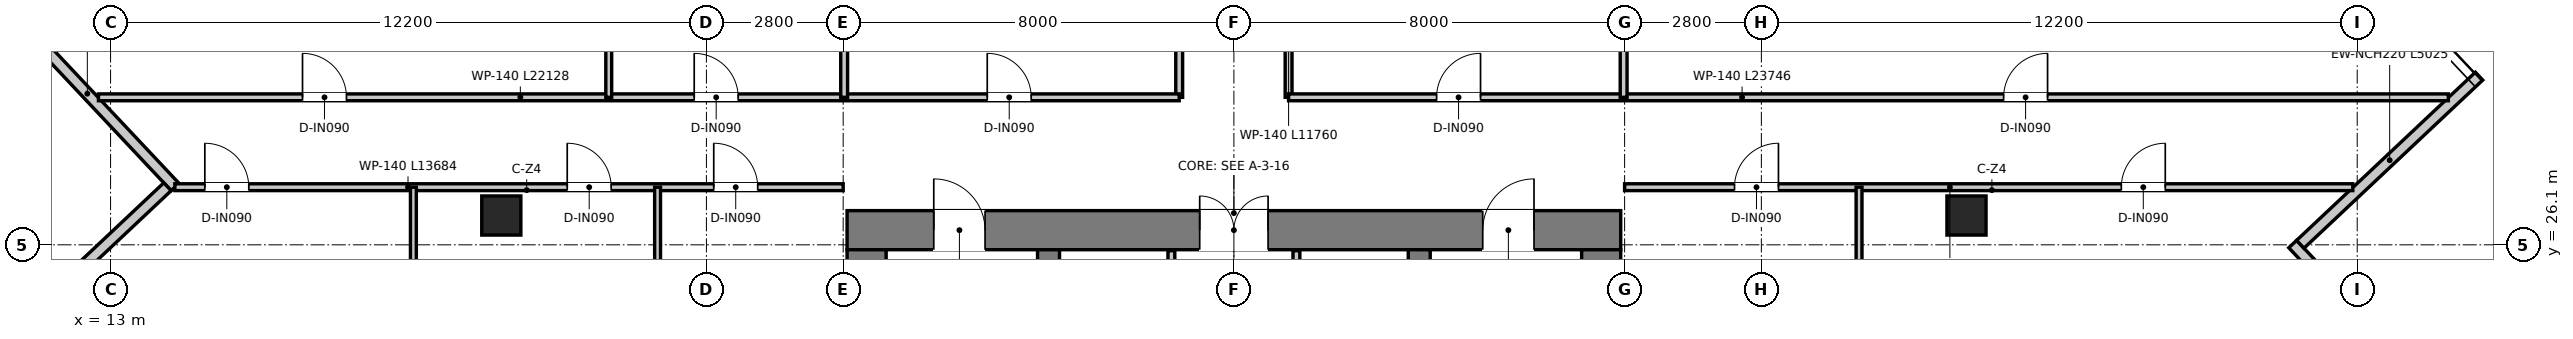
"""IFC4 building model, lengths in metres.
Left out: names, types, materials, properties, quantities, classifications, styles, units other than length and angle.
Written with IfcOpenShell. Run it as: python <this file> out.ifc"""

import sys

from ifc_helpers import new_model, si_unit, direction, frame, frame_2d, origin, origin_2d, place, context, subcontext, project, spatial, rectangle, extrude, source, transform, mapped, element, fill, save


model = new_model("IFC4")
c1 = context("Model", 3, precision=1e-05, world=origin(), true_north=direction((0.0, 1.0)))
c2 = subcontext(c1, "Body", "Model", "MODEL_VIEW")
j1 = project(units=[si_unit("LENGTHUNIT", "METRE"), si_unit("PLANEANGLEUNIT", "RADIAN")], contexts=[c1])
p1 = place(None, origin())
s1 = spatial("IfcSite", under=j1, at=p1, CompositionType="ELEMENT")
p2 = place(p1, origin())
s2 = spatial("IfcBuilding", under=s1, at=p2, CompositionType="ELEMENT")
p3 = place(p2, frame((0.0, 0.0, 238.9)))
s3 = spatial("IfcBuildingStorey", under=s2, at=p3, CompositionType="ELEMENT", Elevation=238.9)
p4 = place(p3, frame((28.08, 26.4, 0.0), z_axis=(0.0, 0.0, 1.0), x_axis=(1.0, 0.0, 0.0)))
e1 = element("IfcWall", 1, at=p4, inside=s3, PredefinedType="SHEAR", context=c2, shape_type="SweptSolid", body=[
    extrude(rectangle(XDim=15.84, YDim=0.8, at=frame_2d((7.92, 0.0))), origin(), (0.0, 0.0, 1.0), 3.95),
])
p5 = place(p4, frame((7.22, 0.0, 0.0)))
e2 = element("IfcOpeningElement", 2, at=p5, cuts=e1, PredefinedType="OPENING", context=c2, shape_type="SweptSolid", body=[
    extrude(rectangle(XDim=1.4, YDim=2.2, at=frame_2d((0.7, 1.1))), frame((0.0, 0.41, 0.0), z_axis=(0.0, -1.0, 0.0), x_axis=(1.0, 0.0, 0.0)), (0.0, 0.0, 1.0), 0.82),
])
p6 = place(p4, frame((1.775, 0.0, 0.0)))
e3 = element("IfcOpeningElement", 3, at=p6, cuts=e1, PredefinedType="OPENING", context=c2, shape_type="SweptSolid", body=[
    extrude(rectangle(XDim=1.05, YDim=2.1, at=frame_2d((0.525, 1.05))), frame((0.0, 0.41, 0.0), z_axis=(0.0, -1.0, 0.0), x_axis=(1.0, 0.0, 0.0)), (0.0, 0.0, 1.0), 0.82),
])
p7 = place(p4, frame((13.015, 0.0, 0.0)))
e4 = element("IfcOpeningElement", 4, at=p7, cuts=e1, PredefinedType="OPENING", context=c2, shape_type="SweptSolid", body=[
    extrude(rectangle(XDim=1.05, YDim=2.1, at=frame_2d((0.525, 1.05))), frame((0.0, 0.41, 0.0), z_axis=(0.0, -1.0, 0.0), x_axis=(1.0, 0.0, 0.0)), (0.0, 0.0, 1.0), 0.82),
])
for number, where, z_axis, x_axis in (
    (5, (28.48, 11.3, 0.0), (0.0, 0.0, 1.0), (0.0, 1.0, 0.0)),
    (6, (43.52, 11.3, 0.0), (0.0, 0.0, 1.0), (0.0, 1.0, 0.0)),
):
    element("IfcWall", number, at=place(p3, frame(where, z_axis=z_axis, x_axis=x_axis)), inside=s3, PredefinedType="SHEAR", context=c2, shape_type="SweptSolid", body=[
        extrude(rectangle(XDim=14.7, YDim=0.8, at=frame_2d((7.35, 0.0))), origin(), (0.0, 0.0, 1.0), 3.95),
    ])
p8 = place(p3, frame((32.205, 13.22, 0.0), z_axis=(0.0, 0.0, 1.0), x_axis=(0.0, 1.0, 0.0)))
e7 = element("IfcWall", 7, at=p8, inside=s3, PredefinedType="SHEAR", context=c2, shape_type="SweptSolid", body=[
    extrude(rectangle(XDim=12.78, YDim=0.45, at=frame_2d((6.39, 0.0))), origin(), (0.0, 0.0, 1.0), 3.95),
])
p9 = place(p8, frame((10.58, 0.0, 0.0)))
e8 = element("IfcOpeningElement", 8, at=p9, cuts=e7, PredefinedType="OPENING", context=c2, shape_type="SweptSolid", body=[
    extrude(rectangle(XDim=1.1, YDim=2.15, at=frame_2d((0.55, 1.075))), frame((0.0, 0.235, 0.0), z_axis=(0.0, -1.0, 0.0), x_axis=(1.0, 0.0, 0.0)), (0.0, 0.0, 1.0), 0.47),
])
p10 = place(p3, frame((39.795, 13.22, 0.0), z_axis=(0.0, 0.0, 1.0), x_axis=(0.0, 1.0, 0.0)))
e9 = element("IfcWall", 9, at=p10, inside=s3, PredefinedType="SHEAR", context=c2, shape_type="SweptSolid", body=[
    extrude(rectangle(XDim=12.78, YDim=0.45, at=frame_2d((6.39, 0.0))), origin(), (0.0, 0.0, 1.0), 3.95),
])
p11 = place(p10, frame((10.58, 0.0, 0.0)))
e10 = element("IfcOpeningElement", 10, at=p11, cuts=e9, PredefinedType="OPENING", context=c2, shape_type="SweptSolid", body=[
    extrude(rectangle(XDim=1.1, YDim=2.15, at=frame_2d((0.55, 1.075))), frame((0.0, 0.235, 0.0), z_axis=(0.0, -1.0, 0.0), x_axis=(1.0, 0.0, 0.0)), (0.0, 0.0, 1.0), 0.47),
])
m1 = source(origin(), c2, "Body", "SweptSolid", [
    extrude(rectangle(XDim=0.8, YDim=0.8, at=origin_2d()), origin(), (0.0, 0.0, 1.0), 3.95),
])
for number, where, z_axis, x_axis in (
    (11, (21.0, 26.7, 0.0), (0.0, 0.0, 1.0), (1.0, 0.0, 0.0)),
    (12, (51.0, 26.7, 0.0), (0.0, 0.0, 1.0), (1.0, 0.0, 0.0)),
):
    element("IfcColumn", number, at=place(p3, frame(where, z_axis=z_axis, x_axis=x_axis)), inside=s3, PredefinedType="COLUMN", context=c2, shape_type="MappedRepresentation", body=[
        mapped(m1, transform((0.0, 0.0, 0.0), x_axis=(1.0, 0.0, 0.0), y_axis=(0.0, 1.0, 0.0), z_axis=(0.0, 0.0, 1.0), scale=1.0)),
    ])
p12 = place(p3, frame((10.727, 31.105, 0.0), z_axis=(0.0, 0.0, 1.0), x_axis=(0.685178828418, -0.728374884992, 0.0)))
e13 = element("IfcWall", 13, at=p12, inside=s3, PredefinedType="ELEMENTEDWALL", context=c2, shape_type="SweptSolid", body=[
    extrude(rectangle(XDim=5.245, YDim=0.22, at=frame_2d((2.623, 0.0))), origin(), (0.0, 0.0, 1.0), 3.67),
])
p13 = place(p3, frame((14.165, 27.289, 0.0), z_axis=(0.0, 0.0, 1.0), x_axis=(-0.728372554527, -0.685181305796, 0.0)))
e14 = element("IfcWall", 14, at=p13, inside=s3, PredefinedType="ELEMENTEDWALL", context=c2, shape_type="SweptSolid", body=[
    extrude(rectangle(XDim=5.025, YDim=0.22, at=frame_2d((2.513, 0.0))), origin(), (0.0, 0.0, 1.0), 3.67),
])
p14 = place(p3, frame((61.273, 22.295, 0.0), z_axis=(0.0, 0.0, 1.0), x_axis=(-0.685178828418, 0.728374884992, 0.0)))
e15 = element("IfcWall", 15, at=p14, inside=s3, PredefinedType="ELEMENTEDWALL", context=c2, shape_type="SweptSolid", body=[
    extrude(rectangle(XDim=5.245, YDim=0.22, at=frame_2d((2.623, 0.0))), origin(), (0.0, 0.0, 1.0), 3.67),
])
p15 = place(p3, frame((57.835, 26.111, 0.0), z_axis=(0.0, 0.0, 1.0), x_axis=(0.728372554527, 0.685181305796, 0.0)))
e16 = element("IfcWall", 16, at=p15, inside=s3, PredefinedType="ELEMENTEDWALL", context=c2, shape_type="SweptSolid", body=[
    extrude(rectangle(XDim=5.025, YDim=0.22, at=frame_2d((2.513, 0.0))), origin(), (0.0, 0.0, 1.0), 3.67),
])
p16 = place(p3, frame((34.72, 20.2, 0.0), z_axis=(0.0, 0.0, 1.0), x_axis=(0.0, 1.0, 0.0)))
e17 = element("IfcWall", 17, at=p16, inside=s3, PredefinedType="PARTITIONING", context=c2, shape_type="SweptSolid", body=[
    extrude(rectangle(XDim=5.78, YDim=0.14, at=frame_2d((2.89, 0.0))), origin(), (0.0, 0.0, 1.0), 2.67),
])
p17 = place(p16, frame((1.05, 0.0, 0.0)))
e18 = element("IfcOpeningElement", 18, at=p17, cuts=e17, PredefinedType="OPENING", context=c2, shape_type="SweptSolid", body=[
    extrude(rectangle(XDim=0.9, YDim=2.1, at=frame_2d((0.45, 1.05))), frame((0.0, 0.08, 0.0), z_axis=(0.0, -1.0, 0.0), x_axis=(1.0, 0.0, 0.0)), (0.0, 0.0, 1.0), 0.16),
])
p18 = place(p3, frame((37.28, 20.2, 0.0), z_axis=(0.0, 0.0, 1.0), x_axis=(0.0, 1.0, 0.0)))
e19 = element("IfcWall", 19, at=p18, inside=s3, PredefinedType="PARTITIONING", context=c2, shape_type="SweptSolid", body=[
    extrude(rectangle(XDim=5.78, YDim=0.14, at=frame_2d((2.89, 0.0))), origin(), (0.0, 0.0, 1.0), 2.67),
])
p19 = place(p18, frame((0.95, 0.0, 0.0)))
e20 = element("IfcOpeningElement", 20, at=p19, cuts=e19, PredefinedType="OPENING", context=c2, shape_type="SweptSolid", body=[
    extrude(rectangle(XDim=1.1, YDim=2.15, at=frame_2d((0.55, 1.075))), frame((0.0, 0.08, 0.0), z_axis=(0.0, -1.0, 0.0), x_axis=(1.0, 0.0, 0.0)), (0.0, 0.0, 1.0), 0.16),
])
p20 = place(p3, frame((34.88, 29.12, 0.0), z_axis=(0.0, 0.0, 1.0), x_axis=(0.0, 1.0, 0.0)))
e21 = element("IfcWall", 21, at=p20, inside=s3, PredefinedType="PARTITIONING", context=c2, shape_type="SweptSolid", body=[
    extrude(rectangle(XDim=11.76, YDim=0.14, at=frame_2d((5.88, 0.0))), origin(), (0.0, 0.0, 1.0), 3.03),
])
p21 = place(p20, frame((3.205, 0.0, 0.0)))
e22 = element("IfcOpeningElement", 22, at=p21, cuts=e21, PredefinedType="OPENING", context=c2, shape_type="SweptSolid", body=[
    extrude(rectangle(XDim=0.95, YDim=2.1, at=frame_2d((0.475, 1.05))), frame((0.0, 0.08, 0.0), z_axis=(0.0, -1.0, 0.0), x_axis=(1.0, 0.0, 0.0)), (0.0, 0.0, 1.0), 0.16),
])
p22 = place(p20, frame((8.02, 0.0, 0.0)))
e23 = element("IfcOpeningElement", 23, at=p22, cuts=e21, PredefinedType="OPENING", context=c2, shape_type="SweptSolid", body=[
    extrude(rectangle(XDim=0.9, YDim=2.1, at=frame_2d((0.45, 1.05))), frame((0.0, 0.08, 0.0), z_axis=(0.0, -1.0, 0.0), x_axis=(1.0, 0.0, 0.0)), (0.0, 0.0, 1.0), 0.16),
])
p23 = place(p3, frame((37.12, 29.12, 0.0), z_axis=(0.0, 0.0, 1.0), x_axis=(0.0, 1.0, 0.0)))
e24 = element("IfcWall", 24, at=p23, inside=s3, PredefinedType="PARTITIONING", context=c2, shape_type="SweptSolid", body=[
    extrude(rectangle(XDim=11.76, YDim=0.14, at=frame_2d((5.88, 0.0))), origin(), (0.0, 0.0, 1.0), 3.03),
])
p24 = place(p23, frame((4.085, 0.0, 0.0)))
e25 = element("IfcOpeningElement", 25, at=p24, cuts=e24, PredefinedType="OPENING", context=c2, shape_type="SweptSolid", body=[
    extrude(rectangle(XDim=0.95, YDim=2.1, at=frame_2d((0.475, 1.05))), frame((0.0, 0.08, 0.0), z_axis=(0.0, -1.0, 0.0), x_axis=(1.0, 0.0, 0.0)), (0.0, 0.0, 1.0), 0.16),
])
p25 = place(p23, frame((6.82, 0.0, 0.0)))
e26 = element("IfcOpeningElement", 26, at=p25, cuts=e24, PredefinedType="OPENING", context=c2, shape_type="SweptSolid", body=[
    extrude(rectangle(XDim=0.9, YDim=2.1, at=frame_2d((0.45, 1.05))), frame((0.0, 0.08, 0.0), z_axis=(0.0, -1.0, 0.0), x_axis=(1.0, 0.0, 0.0)), (0.0, 0.0, 1.0), 0.16),
])
p26 = place(p23, frame((9.83, 0.0, 0.0)))
e27 = element("IfcOpeningElement", 27, at=p26, cuts=e24, PredefinedType="OPENING", context=c2, shape_type="SweptSolid", body=[
    extrude(rectangle(XDim=0.9, YDim=2.1, at=frame_2d((0.45, 1.05))), frame((0.0, 0.08, 0.0), z_axis=(0.0, -1.0, 0.0), x_axis=(1.0, 0.0, 0.0)), (0.0, 0.0, 1.0), 0.16),
])
p27 = place(p3, frame((12.752, 29.12, 0.0), z_axis=(0.0, 0.0, 1.0), x_axis=(1.0, 0.0, 0.0)))
e28 = element("IfcWall", 28, at=p27, inside=s3, PredefinedType="PARTITIONING", context=c2, shape_type="SweptSolid", body=[
    extrude(rectangle(XDim=22.128, YDim=0.14, at=frame_2d((11.064, 0.0))), origin(), (0.0, 0.0, 1.0), 3.03),
])
p28 = place(p27, frame((18.198, 0.0, 0.0)))
e29 = element("IfcOpeningElement", 29, at=p28, cuts=e28, PredefinedType="OPENING", context=c2, shape_type="SweptSolid", body=[
    extrude(rectangle(XDim=0.9, YDim=2.1, at=frame_2d((0.45, 1.05))), frame((0.0, 0.08, 0.0), z_axis=(0.0, -1.0, 0.0), x_axis=(1.0, 0.0, 0.0)), (0.0, 0.0, 1.0), 0.16),
])
p29 = place(p27, frame((4.178, 0.0, 0.0)))
e30 = element("IfcOpeningElement", 30, at=p29, cuts=e28, PredefinedType="OPENING", context=c2, shape_type="SweptSolid", body=[
    extrude(rectangle(XDim=0.9, YDim=2.1, at=frame_2d((0.45, 1.05))), frame((0.0, 0.08, 0.0), z_axis=(0.0, -1.0, 0.0), x_axis=(1.0, 0.0, 0.0)), (0.0, 0.0, 1.0), 0.16),
])
p30 = place(p27, frame((12.198, 0.0, 0.0)))
e31 = element("IfcOpeningElement", 31, at=p30, cuts=e28, PredefinedType="OPENING", context=c2, shape_type="SweptSolid", body=[
    extrude(rectangle(XDim=0.9, YDim=2.1, at=frame_2d((0.45, 1.05))), frame((0.0, 0.08, 0.0), z_axis=(0.0, -1.0, 0.0), x_axis=(1.0, 0.0, 0.0)), (0.0, 0.0, 1.0), 0.16),
])
p31 = place(p3, frame((37.12, 29.12, 0.0), z_axis=(0.0, 0.0, 1.0), x_axis=(1.0, 0.0, 0.0)))
e32 = element("IfcWall", 32, at=p31, inside=s3, PredefinedType="PARTITIONING", context=c2, shape_type="SweptSolid", body=[
    extrude(rectangle(XDim=23.746, YDim=0.14, at=frame_2d((11.873, 0.0))), origin(), (0.0, 0.0, 1.0), 3.03),
])
p32 = place(p31, frame((3.03, 0.0, 0.0)))
e33 = element("IfcOpeningElement", 33, at=p32, cuts=e32, PredefinedType="OPENING", context=c2, shape_type="SweptSolid", body=[
    extrude(rectangle(XDim=0.9, YDim=2.1, at=frame_2d((0.45, 1.05))), frame((0.0, 0.08, 0.0), z_axis=(0.0, -1.0, 0.0), x_axis=(1.0, 0.0, 0.0)), (0.0, 0.0, 1.0), 0.16),
])
p33 = place(p31, frame((14.64, 0.0, 0.0)))
e34 = element("IfcOpeningElement", 34, at=p33, cuts=e32, PredefinedType="OPENING", context=c2, shape_type="SweptSolid", body=[
    extrude(rectangle(XDim=0.9, YDim=2.1, at=frame_2d((0.45, 1.05))), frame((0.0, 0.08, 0.0), z_axis=(0.0, -1.0, 0.0), x_axis=(1.0, 0.0, 0.0)), (0.0, 0.0, 1.0), 0.16),
])
p34 = place(p3, frame((14.316, 27.28, 0.0), z_axis=(0.0, 0.0, 1.0), x_axis=(1.0, 0.0, 0.0)))
e35 = element("IfcWall", 35, at=p34, inside=s3, PredefinedType="PARTITIONING", context=c2, shape_type="SweptSolid", body=[
    extrude(rectangle(XDim=13.684, YDim=0.14, at=frame_2d((6.842, 0.0))), origin(), (0.0, 0.0, 1.0), 3.03),
])
p35 = place(p34, frame((0.614, 0.0, 0.0)))
e36 = element("IfcOpeningElement", 36, at=p35, cuts=e35, PredefinedType="OPENING", context=c2, shape_type="SweptSolid", body=[
    extrude(rectangle(XDim=0.9, YDim=2.1, at=frame_2d((0.45, 1.05))), frame((0.0, 0.08, 0.0), z_axis=(0.0, -1.0, 0.0), x_axis=(1.0, 0.0, 0.0)), (0.0, 0.0, 1.0), 0.16),
])
p36 = place(p34, frame((8.034, 0.0, 0.0)))
e37 = element("IfcOpeningElement", 37, at=p36, cuts=e35, PredefinedType="OPENING", context=c2, shape_type="SweptSolid", body=[
    extrude(rectangle(XDim=0.9, YDim=2.1, at=frame_2d((0.45, 1.05))), frame((0.0, 0.08, 0.0), z_axis=(0.0, -1.0, 0.0), x_axis=(1.0, 0.0, 0.0)), (0.0, 0.0, 1.0), 0.16),
])
p37 = place(p34, frame((11.034, 0.0, 0.0)))
e38 = element("IfcOpeningElement", 38, at=p37, cuts=e35, PredefinedType="OPENING", context=c2, shape_type="SweptSolid", body=[
    extrude(rectangle(XDim=0.9, YDim=2.1, at=frame_2d((0.45, 1.05))), frame((0.0, 0.08, 0.0), z_axis=(0.0, -1.0, 0.0), x_axis=(1.0, 0.0, 0.0)), (0.0, 0.0, 1.0), 0.16),
])
p38 = place(p3, frame((44.0, 27.28, 0.0), z_axis=(0.0, 0.0, 1.0), x_axis=(1.0, 0.0, 0.0)))
e39 = element("IfcWall", 39, at=p38, inside=s3, PredefinedType="PARTITIONING", context=c2, shape_type="SweptSolid", body=[
    extrude(rectangle(XDim=14.91, YDim=0.14, at=frame_2d((7.455, 0.0))), origin(), (0.0, 0.0, 1.0), 3.03),
])
p39 = place(p38, frame((2.25, 0.0, 0.0)))
e40 = element("IfcOpeningElement", 40, at=p39, cuts=e39, PredefinedType="OPENING", context=c2, shape_type="SweptSolid", body=[
    extrude(rectangle(XDim=0.9, YDim=2.1, at=frame_2d((0.45, 1.05))), frame((0.0, 0.08, 0.0), z_axis=(0.0, -1.0, 0.0), x_axis=(1.0, 0.0, 0.0)), (0.0, 0.0, 1.0), 0.16),
])
p40 = place(p38, frame((10.17, 0.0, 0.0)))
e41 = element("IfcOpeningElement", 41, at=p40, cuts=e39, PredefinedType="OPENING", context=c2, shape_type="SweptSolid", body=[
    extrude(rectangle(XDim=0.9, YDim=2.1, at=frame_2d((0.45, 1.05))), frame((0.0, 0.08, 0.0), z_axis=(0.0, -1.0, 0.0), x_axis=(1.0, 0.0, 0.0)), (0.0, 0.0, 1.0), 0.16),
])
for number, where, z_axis, x_axis in (
    (42, (28.02, 29.12, 0.0), (0.0, 0.0, 1.0), (0.0, 1.0, 0.0)),
    (43, (43.98, 29.12, 0.0), (0.0, 0.0, 1.0), (0.0, 1.0, 0.0)),
):
    element("IfcWall", number, at=place(p3, frame(where, z_axis=z_axis, x_axis=x_axis)), inside=s3, PredefinedType="PARTITIONING", context=c2, shape_type="SweptSolid", body=[
        extrude(rectangle(XDim=5.46, YDim=0.14, at=frame_2d((2.73, 0.0))), origin(), (0.0, 0.0, 1.0), 3.37),
    ])
p41 = place(p3, frame((23.2, 29.12, 0.0), z_axis=(0.0, 0.0, 1.0), x_axis=(0.0, 1.0, 0.0)))
e44 = element("IfcWall", 44, at=p41, inside=s3, PredefinedType="PARTITIONING", context=c2, shape_type="SweptSolid", body=[
    extrude(rectangle(XDim=13.56, YDim=0.12, at=frame_2d((6.78, 0.0))), origin(), (0.0, 0.0, 1.0), 3.18),
])
p42 = place(p3, frame((19.2, 16.237, 0.0), z_axis=(0.0, 0.0, 1.0), x_axis=(0.0, 1.0, 0.0)))
e45 = element("IfcWall", 45, at=p42, inside=s3, PredefinedType="PARTITIONING", context=c2, shape_type="SweptSolid", body=[
    extrude(rectangle(XDim=11.043, YDim=0.12, at=frame_2d((5.521, 0.0))), origin(), (0.0, 0.0, 1.0), 3.67),
])
p43 = place(p3, frame((24.2, 12.572, 0.0), z_axis=(0.0, 0.0, 1.0), x_axis=(0.0, 1.0, 0.0)))
e46 = element("IfcWall", 46, at=p43, inside=s3, PredefinedType="PARTITIONING", context=c2, shape_type="SweptSolid", body=[
    extrude(rectangle(XDim=14.708, YDim=0.12, at=frame_2d((7.354, 0.0))), origin(), (0.0, 0.0, 1.0), 3.18),
])
p44 = place(p3, frame((48.8, 10.719, 0.0), z_axis=(0.0, 0.0, 1.0), x_axis=(0.0, 1.0, 0.0)))
e47 = element("IfcWall", 47, at=p44, inside=s3, PredefinedType="PARTITIONING", context=c2, shape_type="SweptSolid", body=[
    extrude(rectangle(XDim=16.561, YDim=0.12, at=frame_2d((8.28, 0.0))), origin(), (0.0, 0.0, 1.0), 3.18),
])
p45 = place(p5, origin())
e48 = element("IfcDoor", 48, at=p45, inside=s3, OperationType="DOUBLE_DOOR_SINGLE_SWING", PredefinedType="DOOR", context=c2, shape_type="SweptSolid", body=[
    extrude(rectangle(XDim=1.4, YDim=2.2, at=frame_2d((0.7, 1.1))), frame((0.0, 0.025, 0.0), z_axis=(0.0, -1.0, 0.0), x_axis=(1.0, 0.0, 0.0)), (0.0, 0.0, 1.0), 0.05),
])
fill(e2, e48)
p46 = place(p6, origin())
e49 = element("IfcDoor", 49, at=p46, inside=s3, OperationType="SINGLE_SWING_LEFT", PredefinedType="DOOR", context=c2, shape_type="SweptSolid", body=[
    extrude(rectangle(XDim=1.05, YDim=2.1, at=frame_2d((0.525, 1.05))), frame((0.0, 0.025, 0.0), z_axis=(0.0, -1.0, 0.0), x_axis=(1.0, 0.0, 0.0)), (0.0, 0.0, 1.0), 0.05),
])
fill(e3, e49)
p47 = place(p7, origin())
e50 = element("IfcDoor", 50, at=p47, inside=s3, OperationType="SINGLE_SWING_RIGHT", PredefinedType="DOOR", context=c2, shape_type="SweptSolid", body=[
    extrude(rectangle(XDim=1.05, YDim=2.1, at=frame_2d((0.525, 1.05))), frame((0.0, 0.025, 0.0), z_axis=(0.0, -1.0, 0.0), x_axis=(1.0, 0.0, 0.0)), (0.0, 0.0, 1.0), 0.05),
])
fill(e4, e50)
p48 = place(p28, origin())
e51 = element("IfcDoor", 51, at=p48, inside=s3, OperationType="SINGLE_SWING_LEFT", PredefinedType="DOOR", context=c2, shape_type="SweptSolid", body=[
    extrude(rectangle(XDim=0.9, YDim=2.1, at=frame_2d((0.45, 1.05))), frame((0.0, 0.025, 0.0), z_axis=(0.0, -1.0, 0.0), x_axis=(1.0, 0.0, 0.0)), (0.0, 0.0, 1.0), 0.05),
])
fill(e29, e51)
p49 = place(p32, origin())
e52 = element("IfcDoor", 52, at=p49, inside=s3, OperationType="SINGLE_SWING_RIGHT", PredefinedType="DOOR", context=c2, shape_type="SweptSolid", body=[
    extrude(rectangle(XDim=0.9, YDim=2.1, at=frame_2d((0.45, 1.05))), frame((0.0, 0.025, 0.0), z_axis=(0.0, -1.0, 0.0), x_axis=(1.0, 0.0, 0.0)), (0.0, 0.0, 1.0), 0.05),
])
fill(e33, e52)
p50 = place(p29, origin())
e53 = element("IfcDoor", 53, at=p50, inside=s3, OperationType="SINGLE_SWING_LEFT", PredefinedType="DOOR", context=c2, shape_type="SweptSolid", body=[
    extrude(rectangle(XDim=0.9, YDim=2.1, at=frame_2d((0.45, 1.05))), frame((0.0, 0.025, 0.0), z_axis=(0.0, -1.0, 0.0), x_axis=(1.0, 0.0, 0.0)), (0.0, 0.0, 1.0), 0.05),
])
fill(e30, e53)
p51 = place(p30, origin())
e54 = element("IfcDoor", 54, at=p51, inside=s3, OperationType="SINGLE_SWING_LEFT", PredefinedType="DOOR", context=c2, shape_type="SweptSolid", body=[
    extrude(rectangle(XDim=0.9, YDim=2.1, at=frame_2d((0.45, 1.05))), frame((0.0, 0.025, 0.0), z_axis=(0.0, -1.0, 0.0), x_axis=(1.0, 0.0, 0.0)), (0.0, 0.0, 1.0), 0.05),
])
fill(e31, e54)
p52 = place(p33, origin())
e55 = element("IfcDoor", 55, at=p52, inside=s3, OperationType="SINGLE_SWING_RIGHT", PredefinedType="DOOR", context=c2, shape_type="SweptSolid", body=[
    extrude(rectangle(XDim=0.9, YDim=2.1, at=frame_2d((0.45, 1.05))), frame((0.0, 0.025, 0.0), z_axis=(0.0, -1.0, 0.0), x_axis=(1.0, 0.0, 0.0)), (0.0, 0.0, 1.0), 0.05),
])
fill(e34, e55)
p53 = place(p35, origin())
e56 = element("IfcDoor", 56, at=p53, inside=s3, OperationType="SINGLE_SWING_LEFT", PredefinedType="DOOR", context=c2, shape_type="SweptSolid", body=[
    extrude(rectangle(XDim=0.9, YDim=2.1, at=frame_2d((0.45, 1.05))), frame((0.0, 0.025, 0.0), z_axis=(0.0, -1.0, 0.0), x_axis=(1.0, 0.0, 0.0)), (0.0, 0.0, 1.0), 0.05),
])
fill(e36, e56)
p54 = place(p36, origin())
e57 = element("IfcDoor", 57, at=p54, inside=s3, OperationType="SINGLE_SWING_LEFT", PredefinedType="DOOR", context=c2, shape_type="SweptSolid", body=[
    extrude(rectangle(XDim=0.9, YDim=2.1, at=frame_2d((0.45, 1.05))), frame((0.0, 0.025, 0.0), z_axis=(0.0, -1.0, 0.0), x_axis=(1.0, 0.0, 0.0)), (0.0, 0.0, 1.0), 0.05),
])
fill(e37, e57)
p55 = place(p37, origin())
e58 = element("IfcDoor", 58, at=p55, inside=s3, OperationType="SINGLE_SWING_LEFT", PredefinedType="DOOR", context=c2, shape_type="SweptSolid", body=[
    extrude(rectangle(XDim=0.9, YDim=2.1, at=frame_2d((0.45, 1.05))), frame((0.0, 0.025, 0.0), z_axis=(0.0, -1.0, 0.0), x_axis=(1.0, 0.0, 0.0)), (0.0, 0.0, 1.0), 0.05),
])
fill(e38, e58)
p56 = place(p39, origin())
e59 = element("IfcDoor", 59, at=p56, inside=s3, OperationType="SINGLE_SWING_RIGHT", PredefinedType="DOOR", context=c2, shape_type="SweptSolid", body=[
    extrude(rectangle(XDim=0.9, YDim=2.1, at=frame_2d((0.45, 1.05))), frame((0.0, 0.025, 0.0), z_axis=(0.0, -1.0, 0.0), x_axis=(1.0, 0.0, 0.0)), (0.0, 0.0, 1.0), 0.05),
])
fill(e40, e59)
p57 = place(p40, origin())
e60 = element("IfcDoor", 60, at=p57, inside=s3, OperationType="SINGLE_SWING_RIGHT", PredefinedType="DOOR", context=c2, shape_type="SweptSolid", body=[
    extrude(rectangle(XDim=0.9, YDim=2.1, at=frame_2d((0.45, 1.05))), frame((0.0, 0.025, 0.0), z_axis=(0.0, -1.0, 0.0), x_axis=(1.0, 0.0, 0.0)), (0.0, 0.0, 1.0), 0.05),
])
fill(e41, e60)
save(model, sys.argv[1])
